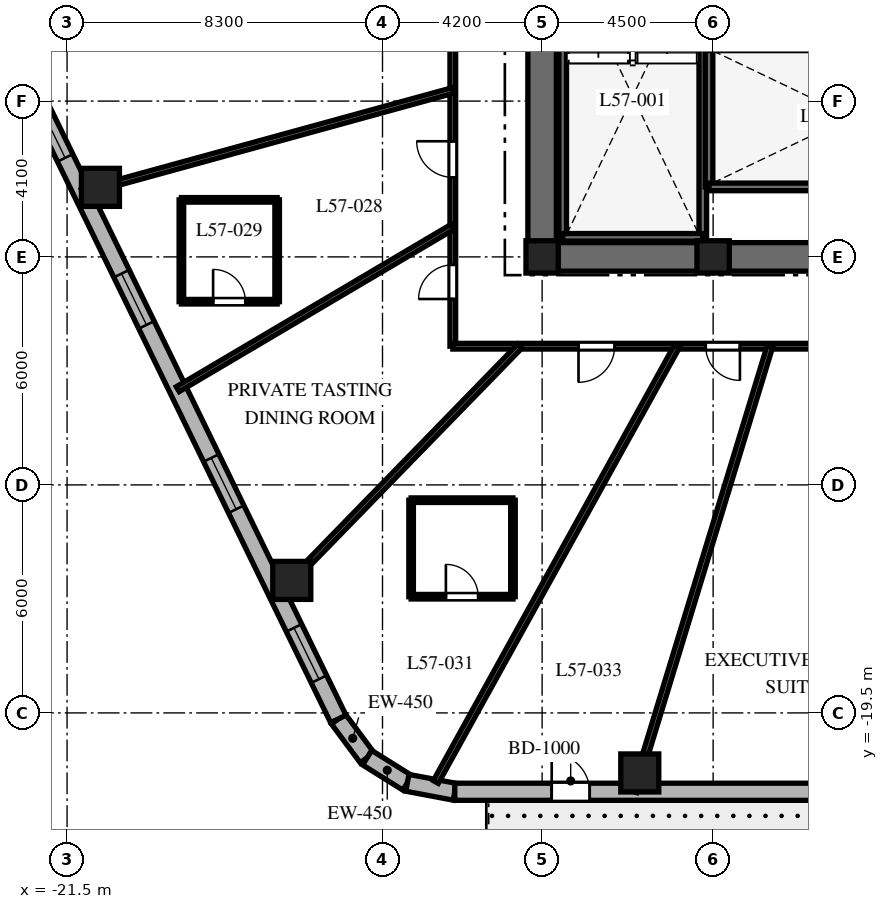
"""IFC4 building model, lengths in metres.
Left out: names, types, materials, properties, quantities, classifications, styles, units other than length and angle.
Written with IfcOpenShell. Run it as: python <this file> out.ifc"""

import sys

from ifc_helpers import new_model, si_unit, direction, frame, frame_2d, origin, origin_2d, place, context, subcontext, project, spatial, rectangle, extrude, element, fill, save


model = new_model("IFC4")
c1 = context("Model", 3, precision=1e-05, world=origin(), true_north=direction((0.0, 1.0)))
c2 = subcontext(c1, "Body", "Model", "MODEL_VIEW")
j1 = project(units=[si_unit("LENGTHUNIT", "METRE"), si_unit("PLANEANGLEUNIT", "RADIAN")], contexts=[c1])
p1 = place(None, origin())
s1 = spatial("IfcSite", under=j1, at=p1, CompositionType="ELEMENT")
p2 = place(p1, origin())
s2 = spatial("IfcBuilding", under=s1, at=p2, CompositionType="ELEMENT")
p3 = place(p2, frame((0.0, 0.0, 229.3)))
s3 = spatial("IfcBuildingStorey", under=s2, at=p3, CompositionType="ELEMENT", Elevation=229.3)
p4 = place(p3, frame((-9.375, -7.5, 0.0), z_axis=(0.0, 0.0, 1.0), x_axis=(1.0, 0.0, 0.0)))
e1 = element("IfcWall", 1, at=p4, inside=s3, PredefinedType="SHEAR", context=c2, shape_type="SweptSolid", body=[
    extrude(rectangle(XDim=18.75, YDim=0.75, at=frame_2d((9.375, 0.0))), origin(), (0.0, 0.0, 1.0), 3.8),
])
p5 = place(p4, frame((9.425, 0.0, 0.0)))
e2 = element("IfcOpeningElement", 2, at=p5, cuts=e1, PredefinedType="OPENING", context=c2, shape_type="SweptSolid", body=[
    extrude(rectangle(XDim=1.0, YDim=2.15, at=frame_2d((0.5, 1.075))), frame((0.0, 0.385, 0.0), z_axis=(0.0, -1.0, 0.0), x_axis=(1.0, 0.0, 0.0)), (0.0, 0.0, 1.0), 0.77),
])
p6 = place(p3, frame((-9.0, -7.125, 0.0), z_axis=(0.0, 0.0, 1.0), x_axis=(0.0, 1.0, 0.0)))
e3 = element("IfcWall", 3, at=p6, inside=s3, PredefinedType="SHEAR", context=c2, shape_type="SweptSolid", body=[
    extrude(rectangle(XDim=14.25, YDim=0.75, at=frame_2d((7.125, 0.0))), origin(), (0.0, 0.0, 1.0), 3.8),
])
p7 = place(p6, frame((10.25, 0.0, 0.0)))
e4 = element("IfcOpeningElement", 4, at=p7, cuts=e3, PredefinedType="OPENING", context=c2, shape_type="SweptSolid", body=[
    extrude(rectangle(XDim=1.05, YDim=2.15, at=frame_2d((0.525, 1.075))), frame((0.0, 0.385, 0.0), z_axis=(0.0, -1.0, 0.0), x_axis=(1.0, 0.0, 0.0)), (0.0, 0.0, 1.0), 0.77),
])
for number, where, z_axis, x_axis in (
    (5, (-8.458, -6.985, 0.0), (0.0, 0.0, 1.0), (0.0, 1.0, 0.0)),
    (6, (-4.772, -6.985, 0.0), (0.0, 0.0, 1.0), (0.0, 1.0, 0.0)),
):
    element("IfcWall", number, at=place(p3, frame(where, z_axis=z_axis, x_axis=x_axis)), inside=s3, PredefinedType="SHEAR", context=c2, shape_type="SweptSolid", body=[
        extrude(rectangle(XDim=9.143, YDim=0.2, at=frame_2d((4.572, 0.0))), origin(), (0.0, 0.0, 1.0), 3.8),
    ])
for number, where, z_axis, x_axis in (
    (7, (-8.458, -6.985, 0.0), (0.0, 0.0, 1.0), (1.0, 0.0, 0.0)),
    (8, (-4.608, -5.658, 0.0), (0.0, 0.0, 1.0), (0.0, 1.0, 0.0)),
):
    element("IfcWall", number, at=place(p3, frame(where, z_axis=z_axis, x_axis=x_axis)), inside=s3, PredefinedType="SHEAR", context=c2, shape_type="SweptSolid", body=[
        extrude(rectangle(XDim=3.686, YDim=0.2, at=frame_2d((1.843, 0.0))), origin(), (0.0, 0.0, 1.0), 3.8),
    ])
p8 = place(p3, frame((-4.608, -5.658, 0.0), z_axis=(0.0, 0.0, 1.0), x_axis=(1.0, 0.0, 0.0)))
e9 = element("IfcWall", 9, at=p8, inside=s3, PredefinedType="SHEAR", context=c2, shape_type="SweptSolid", body=[
    extrude(rectangle(XDim=9.166, YDim=0.2, at=frame_2d((4.583, 0.0))), origin(), (0.0, 0.0, 1.0), 3.8),
])
p9 = place(p8, frame((7.45, 0.0, 0.0)))
e10 = element("IfcOpeningElement", 10, at=p9, cuts=e9, PredefinedType="OPENING", context=c2, shape_type="SweptSolid", body=[
    extrude(rectangle(XDim=1.0, YDim=2.15, at=frame_2d((0.5, 1.075))), frame((0.0, 0.11, 0.0), z_axis=(0.0, -1.0, 0.0), x_axis=(1.0, 0.0, 0.0)), (0.0, 0.0, 1.0), 0.22),
])
for number, where, z_axis, x_axis in (
    (11, (-9.0, -7.5, 0.0), (0.0, 0.0, 1.0), (1.0, 0.0, 0.0)),
    (12, (-4.5, -7.5, 0.0), (0.0, 0.0, 1.0), (1.0, 0.0, 0.0)),
):
    element("IfcColumn", number, at=place(p3, frame(where, z_axis=z_axis, x_axis=x_axis)), inside=s3, PredefinedType="COLUMN", context=c2, shape_type="SweptSolid", body=[
        extrude(rectangle(XDim=0.85, YDim=0.85, at=origin_2d()), origin(), (0.0, 0.0, 1.0), 3.8),
    ])
for number, where, z_axis, x_axis in (
    (13, (-6.43, -21.08, 0.0), (0.0, 0.0, 1.0), (1.0, 0.0, 0.0)),
    (14, (-20.622, -5.67, 0.0), (0.0, 0.0, 1.0), (1.0, 0.0, 0.0)),
    (15, (-15.587, -16.013, 0.0), (0.0, 0.0, 1.0), (1.0, 0.0, 0.0)),
):
    element("IfcColumn", number, at=place(p3, frame(where, z_axis=z_axis, x_axis=x_axis)), inside=s3, PredefinedType="COLUMN", context=c2, shape_type="SweptSolid", body=[
        extrude(rectangle(XDim=1.0, YDim=1.0, at=origin_2d()), origin(), (0.0, 0.0, 1.0), 3.8),
    ])
p10 = place(p3, frame((-14.362, -19.658, 0.0), z_axis=(0.0, 0.0, 1.0), x_axis=(0.596642462792, -0.80250717853, 0.0)))
e16 = element("IfcWall", 16, at=p10, inside=s3, PredefinedType="SOLIDWALL", context=c2, shape_type="SweptSolid", body=[
    extrude(rectangle(XDim=1.27, YDim=0.45, at=frame_2d((0.635, 0.0))), origin(), (0.0, 0.0, 1.0), 3.5),
])
p11 = place(p3, frame((-13.604, -20.678, 0.0), z_axis=(0.0, 0.0, 1.0), x_axis=(0.847910404124, -0.53013955387, 0.0)))
e17 = element("IfcWall", 17, at=p11, inside=s3, PredefinedType="SOLIDWALL", context=c2, shape_type="SweptSolid", body=[
    extrude(rectangle(XDim=1.249, YDim=0.45, at=frame_2d((0.624, 0.0))), origin(), (0.0, 0.0, 1.0), 3.5),
])
p12 = place(p3, frame((-12.546, -21.34, 0.0), z_axis=(0.0, 0.0, 1.0), x_axis=(0.982686750835, -0.18527479519, 0.0)))
e18 = element("IfcWall", 18, at=p12, inside=s3, PredefinedType="SOLIDWALL", context=c2, shape_type="SweptSolid", body=[
    extrude(rectangle(XDim=1.27, YDim=0.45, at=frame_2d((0.635, 0.0))), origin(), (0.0, 0.0, 1.0), 3.5),
])
p13 = place(p3, frame((-11.298, -21.575, 0.0), z_axis=(0.0, 0.0, 1.0), x_axis=(1.0, 0.0, 0.0)))
e19 = element("IfcWall", 19, at=p13, inside=s3, PredefinedType="SOLIDWALL", context=c2, shape_type="SweptSolid", body=[
    extrude(rectangle(XDim=24.399, YDim=0.45, at=frame_2d((12.2, 0.0))), origin(), (0.0, 0.0, 1.0), 3.5),
])
p14 = place(p13, frame((2.55, 0.0, 0.0)))
e20 = element("IfcOpeningElement", 20, at=p14, cuts=e19, PredefinedType="OPENING", context=c2, shape_type="SweptSolid", body=[
    extrude(rectangle(XDim=1.0, YDim=2.15, at=frame_2d((0.5, 1.075))), frame((0.0, 0.235, 0.0), z_axis=(0.0, -1.0, 0.0), x_axis=(1.0, 0.0, 0.0)), (0.0, 0.0, 1.0), 0.47),
])
p15 = place(p13, frame((11.151, 0.0, 0.8)))
e21 = element("IfcOpeningElement", 21, at=p15, cuts=e19, PredefinedType="OPENING", context=c2, shape_type="SweptSolid", body=[
    extrude(rectangle(XDim=2.1, YDim=1.85, at=frame_2d((1.05, 0.925))), frame((0.0, 0.235, 0.0), z_axis=(0.0, -1.0, 0.0), x_axis=(1.0, 0.0, 0.0)), (0.0, 0.0, 1.0), 0.47),
])
p16 = place(p13, frame((20.996, 0.0, 0.8)))
e22 = element("IfcOpeningElement", 22, at=p16, cuts=e19, PredefinedType="OPENING", context=c2, shape_type="SweptSolid", body=[
    extrude(rectangle(XDim=2.1, YDim=1.85, at=frame_2d((1.05, 0.925))), frame((0.0, 0.235, 0.0), z_axis=(0.0, -1.0, 0.0), x_axis=(1.0, 0.0, 0.0)), (0.0, 0.0, 1.0), 0.47),
])
p17 = place(p3, frame((-22.74, -2.452, 0.0), z_axis=(0.0, 0.0, 1.0), x_axis=(0.437753424814, -0.899095066755, 0.0)))
e23 = element("IfcWall", 23, at=p17, inside=s3, PredefinedType="SOLIDWALL", context=c2, shape_type="SweptSolid", body=[
    extrude(rectangle(XDim=19.137, YDim=0.45, at=frame_2d((9.569, 0.0))), origin(), (0.0, 0.0, 1.0), 3.5),
])
p18 = place(p17, frame((1.216, 0.0, 0.8)))
e24 = element("IfcOpeningElement", 24, at=p18, cuts=e23, PredefinedType="OPENING", context=c2, shape_type="SweptSolid", body=[
    extrude(rectangle(XDim=1.5, YDim=1.8, at=frame_2d((0.75, 0.9))), frame((0.0, 0.235, 0.0), z_axis=(0.0, -1.0, 0.0), x_axis=(1.0, 0.0, 0.0)), (0.0, 0.0, 1.0), 0.47),
])
p19 = place(p17, frame((6.105, 0.0, 0.8)))
e25 = element("IfcOpeningElement", 25, at=p19, cuts=e23, PredefinedType="OPENING", context=c2, shape_type="SweptSolid", body=[
    extrude(rectangle(XDim=1.5, YDim=1.8, at=frame_2d((0.75, 0.9))), frame((0.0, 0.235, 0.0), z_axis=(0.0, -1.0, 0.0), x_axis=(1.0, 0.0, 0.0)), (0.0, 0.0, 1.0), 0.47),
])
p20 = place(p17, frame((11.499, 0.0, 0.8)))
e26 = element("IfcOpeningElement", 26, at=p20, cuts=e23, PredefinedType="OPENING", context=c2, shape_type="SweptSolid", body=[
    extrude(rectangle(XDim=1.5, YDim=1.8, at=frame_2d((0.75, 0.9))), frame((0.0, 0.235, 0.0), z_axis=(0.0, -1.0, 0.0), x_axis=(1.0, 0.0, 0.0)), (0.0, 0.0, 1.0), 0.47),
])
p21 = place(p17, frame((16.473, 0.0, 0.8)))
e27 = element("IfcOpeningElement", 27, at=p21, cuts=e23, PredefinedType="OPENING", context=c2, shape_type="SweptSolid", body=[
    extrude(rectangle(XDim=1.5, YDim=1.8, at=frame_2d((0.75, 0.9))), frame((0.0, 0.235, 0.0), z_axis=(0.0, -1.0, 0.0), x_axis=(1.0, 0.0, 0.0)), (0.0, 0.0, 1.0), 0.47),
])
p22 = place(p3, frame((-11.35, -9.85, 0.0), z_axis=(0.0, 0.0, 1.0), x_axis=(0.0, 1.0, 0.0)))
e28 = element("IfcWall", 28, at=p22, inside=s3, PredefinedType="PARTITIONING", context=c2, shape_type="SweptSolid", body=[
    extrude(rectangle(XDim=12.4, YDim=0.15, at=frame_2d((6.2, 0.0))), origin(), (0.0, 0.0, 1.0), 2.99),
])
p23 = place(p22, frame((8.835, 0.0, 0.0)))
e29 = element("IfcOpeningElement", 29, at=p23, cuts=e28, PredefinedType="OPENING", context=c2, shape_type="SweptSolid", body=[
    extrude(rectangle(XDim=0.95, YDim=2.03, at=frame_2d((0.475, 1.015))), frame((0.0, 0.085, 0.0), z_axis=(0.0, -1.0, 0.0), x_axis=(1.0, 0.0, 0.0)), (0.0, 0.0, 1.0), 0.17),
])
p24 = place(p22, frame((4.443, 0.0, 0.0)))
e30 = element("IfcOpeningElement", 30, at=p24, cuts=e28, PredefinedType="OPENING", context=c2, shape_type="SweptSolid", body=[
    extrude(rectangle(XDim=0.95, YDim=2.03, at=frame_2d((0.475, 1.015))), frame((0.0, 0.085, 0.0), z_axis=(0.0, -1.0, 0.0), x_axis=(1.0, 0.0, 0.0)), (0.0, 0.0, 1.0), 0.17),
])
p25 = place(p22, frame((1.242, 0.0, 0.0)))
e31 = element("IfcOpeningElement", 31, at=p25, cuts=e28, PredefinedType="OPENING", context=c2, shape_type="SweptSolid", body=[
    extrude(rectangle(XDim=0.9, YDim=2.03, at=frame_2d((0.45, 1.015))), frame((0.0, 0.085, 0.0), z_axis=(0.0, -1.0, 0.0), x_axis=(1.0, 0.0, 0.0)), (0.0, 0.0, 1.0), 0.17),
])
p26 = place(p3, frame((-0.92, -9.85, 0.0), z_axis=(0.0, 0.0, 1.0), x_axis=(-1.0, 0.0, 0.0)))
e32 = element("IfcWall", 32, at=p26, inside=s3, PredefinedType="PARTITIONING", context=c2, shape_type="SweptSolid", body=[
    extrude(rectangle(XDim=10.43, YDim=0.15, at=frame_2d((5.215, 0.0))), origin(), (0.0, 0.0, 1.0), 2.99),
])
p27 = place(p26, frame((6.172, 0.0, 0.0)))
e33 = element("IfcOpeningElement", 33, at=p27, cuts=e32, PredefinedType="OPENING", context=c2, shape_type="SweptSolid", body=[
    extrude(rectangle(XDim=0.95, YDim=2.03, at=frame_2d((0.475, 1.015))), frame((0.0, 0.085, 0.0), z_axis=(0.0, -1.0, 0.0), x_axis=(1.0, 0.0, 0.0)), (0.0, 0.0, 1.0), 0.17),
])
p28 = place(p26, frame((2.875, 0.0, 0.0)))
e34 = element("IfcOpeningElement", 34, at=p28, cuts=e32, PredefinedType="OPENING", context=c2, shape_type="SweptSolid", body=[
    extrude(rectangle(XDim=0.9, YDim=2.03, at=frame_2d((0.45, 1.015))), frame((0.0, 0.085, 0.0), z_axis=(0.0, -1.0, 0.0), x_axis=(1.0, 0.0, 0.0)), (0.0, 0.0, 1.0), 0.17),
])
p29 = place(p3, frame((-11.35, -3.121, 0.0), z_axis=(0.0, 0.0, 1.0), x_axis=(-0.964212793822, -0.265129568758, 0.0)))
e35 = element("IfcWall", 35, at=p29, inside=s3, PredefinedType="PARTITIONING", context=c2, shape_type="SweptSolid", body=[
    extrude(rectangle(XDim=10.12, YDim=0.15, at=frame_2d((5.06, 0.0))), origin(), (0.0, 0.0, 1.0), 2.74),
])
p30 = place(p3, frame((-11.35, -6.705, 0.0), z_axis=(0.0, 0.0, 1.0), x_axis=(-0.86097625004, -0.508645158108, 0.0)))
e36 = element("IfcWall", 36, at=p30, inside=s3, PredefinedType="PARTITIONING", context=c2, shape_type="SweptSolid", body=[
    extrude(rectangle(XDim=8.406, YDim=0.15, at=frame_2d((4.203, 0.0))), origin(), (0.0, 0.0, 1.0), 2.74),
])
p31 = place(p3, frame((-9.588, -9.85, 0.0), z_axis=(0.0, 0.0, 1.0), x_axis=(-0.697519469595, -0.716565830567, 0.0)))
e37 = element("IfcWall", 37, at=p31, inside=s3, PredefinedType="PARTITIONING", context=c2, shape_type="SweptSolid", body=[
    extrude(rectangle(XDim=9.126, YDim=0.15, at=frame_2d((4.563, 0.0))), origin(), (0.0, 0.0, 1.0), 2.74),
])
p32 = place(p3, frame((-5.451, -9.85, 0.0), z_axis=(0.0, 0.0, 1.0), x_axis=(-0.484188830955, -0.87496352837, 0.0)))
e38 = element("IfcWall", 38, at=p32, inside=s3, PredefinedType="PARTITIONING", context=c2, shape_type="SweptSolid", body=[
    extrude(rectangle(XDim=13.107, YDim=0.15, at=frame_2d((6.553, 0.0))), origin(), (0.0, 0.0, 1.0), 2.74),
])
p33 = place(p3, frame((-3.004, -9.85, 0.0), z_axis=(0.0, 0.0, 1.0), x_axis=(-0.291775760688, -0.956486751333, 0.0)))
e39 = element("IfcWall", 39, at=p33, inside=s3, PredefinedType="PARTITIONING", context=c2, shape_type="SweptSolid", body=[
    extrude(rectangle(XDim=12.258, YDim=0.15, at=frame_2d((6.129, 0.0))), origin(), (0.0, 0.0, 1.0), 2.74),
])
p34 = place(p3, frame((-18.492, -8.679, 0.0), z_axis=(0.0, 0.0, 1.0), x_axis=(1.0, 0.0, 0.0)))
e40 = element("IfcWall", 40, at=p34, inside=s3, PredefinedType="PARTITIONING", context=c2, shape_type="SweptSolid", body=[
    extrude(rectangle(XDim=2.52, YDim=0.12, at=frame_2d((1.26, 0.0))), origin(), (0.0, 0.0, 1.0), 3.5),
])
p35 = place(p34, frame((0.835, 0.0, 0.0)))
e41 = element("IfcOpeningElement", 41, at=p35, cuts=e40, PredefinedType="OPENING", context=c2, shape_type="SweptSolid", body=[
    extrude(rectangle(XDim=0.85, YDim=2.03, at=frame_2d((0.425, 1.015))), frame((0.0, 0.07, 0.0), z_axis=(0.0, -1.0, 0.0), x_axis=(1.0, 0.0, 0.0)), (0.0, 0.0, 1.0), 0.14),
])
p36 = place(p3, frame((-15.972, -8.679, 0.0), z_axis=(0.0, 0.0, 1.0), x_axis=(0.0, 1.0, 0.0)))
e42 = element("IfcWall", 42, at=p36, inside=s3, PredefinedType="PARTITIONING", context=c2, shape_type="SweptSolid", body=[
    extrude(rectangle(XDim=2.68, YDim=0.12, at=frame_2d((1.34, 0.0))), origin(), (0.0, 0.0, 1.0), 2.99),
])
p37 = place(p3, frame((-15.972, -5.999, 0.0), z_axis=(0.0, 0.0, 1.0), x_axis=(-1.0, 0.0, 0.0)))
e43 = element("IfcWall", 43, at=p37, inside=s3, PredefinedType="PARTITIONING", context=c2, shape_type="SweptSolid", body=[
    extrude(rectangle(XDim=2.52, YDim=0.12, at=frame_2d((1.26, 0.0))), origin(), (0.0, 0.0, 1.0), 2.94),
])
p38 = place(p3, frame((-18.492, -5.999, 0.0), z_axis=(0.0, 0.0, 1.0), x_axis=(0.0, -1.0, 0.0)))
e44 = element("IfcWall", 44, at=p38, inside=s3, PredefinedType="PARTITIONING", context=c2, shape_type="SweptSolid", body=[
    extrude(rectangle(XDim=2.68, YDim=0.12, at=frame_2d((1.34, 0.0))), origin(), (0.0, 0.0, 1.0), 2.99),
])
p39 = place(p3, frame((-12.447, -16.442, 0.0), z_axis=(0.0, 0.0, 1.0), x_axis=(1.0, 0.0, 0.0)))
e45 = element("IfcWall", 45, at=p39, inside=s3, PredefinedType="PARTITIONING", context=c2, shape_type="SweptSolid", body=[
    extrude(rectangle(XDim=2.68, YDim=0.12, at=frame_2d((1.34, 0.0))), origin(), (0.0, 0.0, 1.0), 3.5),
])
p40 = place(p39, frame((0.915, 0.0, 0.0)))
e46 = element("IfcOpeningElement", 46, at=p40, cuts=e45, PredefinedType="OPENING", context=c2, shape_type="SweptSolid", body=[
    extrude(rectangle(XDim=0.85, YDim=2.03, at=frame_2d((0.425, 1.015))), frame((0.0, 0.07, 0.0), z_axis=(0.0, -1.0, 0.0), x_axis=(1.0, 0.0, 0.0)), (0.0, 0.0, 1.0), 0.14),
])
p41 = place(p3, frame((-9.767, -16.442, 0.0), z_axis=(0.0, 0.0, 1.0), x_axis=(0.0, 1.0, 0.0)))
e47 = element("IfcWall", 47, at=p41, inside=s3, PredefinedType="PARTITIONING", context=c2, shape_type="SweptSolid", body=[
    extrude(rectangle(XDim=2.54, YDim=0.12, at=frame_2d((1.27, 0.0))), origin(), (0.0, 0.0, 1.0), 3.072),
])
p42 = place(p3, frame((-9.767, -13.902, 0.0), z_axis=(0.0, 0.0, 1.0), x_axis=(-1.0, 0.0, 0.0)))
e48 = element("IfcWall", 48, at=p42, inside=s3, PredefinedType="PARTITIONING", context=c2, shape_type="SweptSolid", body=[
    extrude(rectangle(XDim=2.68, YDim=0.12, at=frame_2d((1.34, 0.0))), origin(), (0.0, 0.0, 1.0), 3.072),
])
p43 = place(p3, frame((-12.447, -13.902, 0.0), z_axis=(0.0, 0.0, 1.0), x_axis=(0.0, -1.0, 0.0)))
e49 = element("IfcWall", 49, at=p43, inside=s3, PredefinedType="PARTITIONING", context=c2, shape_type="SweptSolid", body=[
    extrude(rectangle(XDim=2.54, YDim=0.12, at=frame_2d((1.27, 0.0))), origin(), (0.0, 0.0, 1.0), 3.5),
])
p44 = place(p14, origin())
e50 = element("IfcDoor", 50, at=p44, inside=s3, OperationType="SINGLE_SWING_LEFT", PredefinedType="DOOR", context=c2, shape_type="SweptSolid", body=[
    extrude(rectangle(XDim=1.0, YDim=2.15, at=frame_2d((0.5, 1.075))), frame((0.0, 0.025, 0.0), z_axis=(0.0, -1.0, 0.0), x_axis=(1.0, 0.0, 0.0)), (0.0, 0.0, 1.0), 0.05),
])
fill(e20, e50)
p45 = place(p18, origin())
e51 = element("IfcWindow", 51, at=p45, inside=s3, PartitioningType="SINGLE_PANEL", PredefinedType="WINDOW", context=c2, shape_type="SweptSolid", body=[
    extrude(rectangle(XDim=1.5, YDim=1.8, at=frame_2d((0.75, 0.9))), frame((0.0, 0.03, 0.0), z_axis=(0.0, -1.0, 0.0), x_axis=(1.0, 0.0, 0.0)), (0.0, 0.0, 1.0), 0.06),
])
fill(e24, e51)
p46 = place(p19, origin())
e52 = element("IfcWindow", 52, at=p46, inside=s3, PartitioningType="SINGLE_PANEL", PredefinedType="WINDOW", context=c2, shape_type="SweptSolid", body=[
    extrude(rectangle(XDim=1.5, YDim=1.8, at=frame_2d((0.75, 0.9))), frame((0.0, 0.03, 0.0), z_axis=(0.0, -1.0, 0.0), x_axis=(1.0, 0.0, 0.0)), (0.0, 0.0, 1.0), 0.06),
])
fill(e25, e52)
p47 = place(p20, origin())
e53 = element("IfcWindow", 53, at=p47, inside=s3, PartitioningType="SINGLE_PANEL", PredefinedType="WINDOW", context=c2, shape_type="SweptSolid", body=[
    extrude(rectangle(XDim=1.5, YDim=1.8, at=frame_2d((0.75, 0.9))), frame((0.0, 0.03, 0.0), z_axis=(0.0, -1.0, 0.0), x_axis=(1.0, 0.0, 0.0)), (0.0, 0.0, 1.0), 0.06),
])
fill(e26, e53)
p48 = place(p21, origin())
e54 = element("IfcWindow", 54, at=p48, inside=s3, PartitioningType="SINGLE_PANEL", PredefinedType="WINDOW", context=c2, shape_type="SweptSolid", body=[
    extrude(rectangle(XDim=1.5, YDim=1.8, at=frame_2d((0.75, 0.9))), frame((0.0, 0.03, 0.0), z_axis=(0.0, -1.0, 0.0), x_axis=(1.0, 0.0, 0.0)), (0.0, 0.0, 1.0), 0.06),
])
fill(e27, e54)
p49 = place(p24, origin())
e55 = element("IfcDoor", 55, at=p49, inside=s3, OperationType="SINGLE_SWING_RIGHT", PredefinedType="DOOR", context=c2, shape_type="SweptSolid", body=[
    extrude(rectangle(XDim=0.95, YDim=2.03, at=frame_2d((0.475, 1.015))), frame((0.0, 0.025, 0.0), z_axis=(0.0, -1.0, 0.0), x_axis=(1.0, 0.0, 0.0)), (0.0, 0.0, 1.0), 0.05),
])
fill(e30, e55)
p50 = place(p35, origin())
e56 = element("IfcDoor", 56, at=p50, inside=s3, OperationType="SINGLE_SWING_LEFT", PredefinedType="DOOR", context=c2, shape_type="SweptSolid", body=[
    extrude(rectangle(XDim=0.85, YDim=2.03, at=frame_2d((0.425, 1.015))), frame((0.0, 0.025, 0.0), z_axis=(0.0, -1.0, 0.0), x_axis=(1.0, 0.0, 0.0)), (0.0, 0.0, 1.0), 0.05),
])
fill(e41, e56)
p51 = place(p25, origin())
e57 = element("IfcDoor", 57, at=p51, inside=s3, OperationType="SINGLE_SWING_LEFT", PredefinedType="DOOR", context=c2, shape_type="SweptSolid", body=[
    extrude(rectangle(XDim=0.9, YDim=2.03, at=frame_2d((0.45, 1.015))), frame((0.0, 0.025, 0.0), z_axis=(0.0, -1.0, 0.0), x_axis=(1.0, 0.0, 0.0)), (0.0, 0.0, 1.0), 0.05),
])
fill(e31, e57)
p52 = place(p27, origin())
e58 = element("IfcDoor", 58, at=p52, inside=s3, OperationType="SINGLE_SWING_RIGHT", PredefinedType="DOOR", context=c2, shape_type="SweptSolid", body=[
    extrude(rectangle(XDim=0.95, YDim=2.03, at=frame_2d((0.475, 1.015))), frame((0.0, 0.025, 0.0), z_axis=(0.0, -1.0, 0.0), x_axis=(1.0, 0.0, 0.0)), (0.0, 0.0, 1.0), 0.05),
])
fill(e33, e58)
p53 = place(p40, origin())
e59 = element("IfcDoor", 59, at=p53, inside=s3, OperationType="SINGLE_SWING_LEFT", PredefinedType="DOOR", context=c2, shape_type="SweptSolid", body=[
    extrude(rectangle(XDim=0.85, YDim=2.03, at=frame_2d((0.425, 1.015))), frame((0.0, 0.025, 0.0), z_axis=(0.0, -1.0, 0.0), x_axis=(1.0, 0.0, 0.0)), (0.0, 0.0, 1.0), 0.05),
])
fill(e46, e59)
p54 = place(p28, origin())
e60 = element("IfcDoor", 60, at=p54, inside=s3, OperationType="SINGLE_SWING_LEFT", PredefinedType="DOOR", context=c2, shape_type="SweptSolid", body=[
    extrude(rectangle(XDim=0.9, YDim=2.03, at=frame_2d((0.45, 1.015))), frame((0.0, 0.025, 0.0), z_axis=(0.0, -1.0, 0.0), x_axis=(1.0, 0.0, 0.0)), (0.0, 0.0, 1.0), 0.05),
])
fill(e34, e60)
save(model, sys.argv[1])
